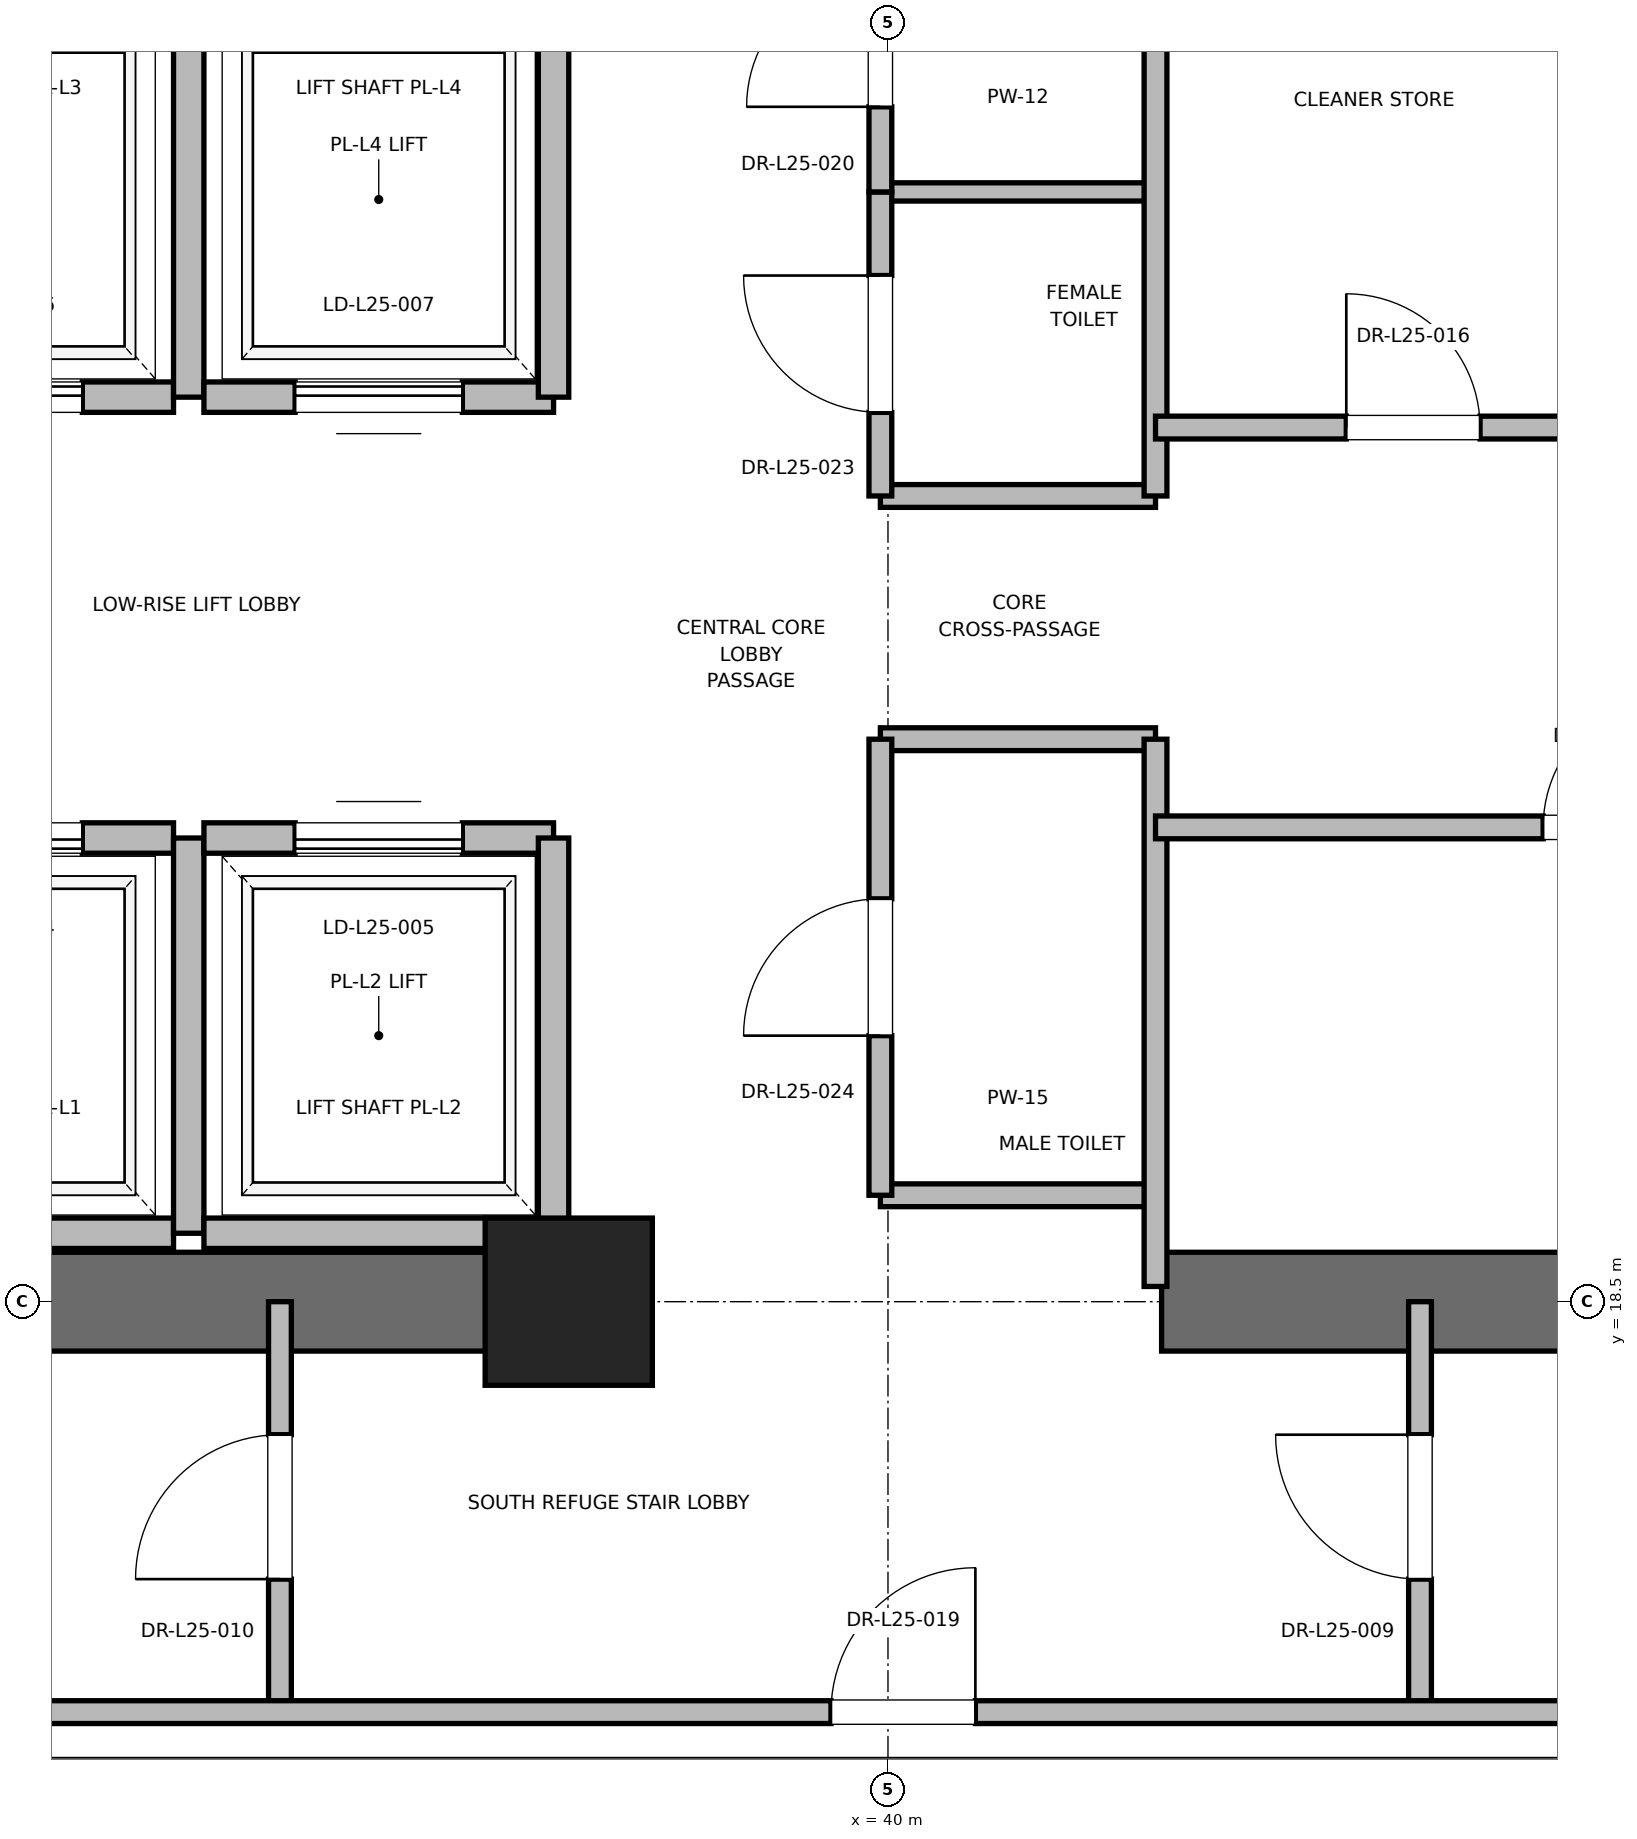
"""IFC4 building model, lengths in metres.
Left out: names, types, materials, properties, quantities, classifications, styles, units other than length and angle.
Written with IfcOpenShell. Run it as: python <this file> out.ifc"""

import sys

from ifc_helpers import new_model, si_unit, direction, frame, frame_2d, origin, origin_2d, place, context, subcontext, project, spatial, rectangle, extrude, element, fill, save


model = new_model("IFC4")
c1 = context("Model", 3, precision=1e-05, world=origin(), true_north=direction((0.0, 1.0)))
c2 = subcontext(c1, "Body", "Model", "MODEL_VIEW")
j1 = project(units=[si_unit("LENGTHUNIT", "METRE"), si_unit("PLANEANGLEUNIT", "RADIAN")], contexts=[c1])
p1 = place(None, origin())
s1 = spatial("IfcSite", under=j1, at=p1, CompositionType="ELEMENT")
p2 = place(p1, origin())
s2 = spatial("IfcBuilding", under=s1, at=p2, CompositionType="ELEMENT")
p3 = place(p2, frame((0.0, 0.0, 107.6)))
s3 = spatial("IfcBuildingStorey", under=s2, at=p3, CompositionType="ELEMENT", Elevation=107.6)
p4 = place(p3, frame((37.9, 18.5, 0.0), z_axis=(0.0, 0.0, 1.0), x_axis=(1.0, 0.0, 0.0)))
e1 = element("IfcColumn", 1, at=p4, inside=s3, PredefinedType="PILASTER", context=c2, shape_type="SweptSolid", body=[
    extrude(rectangle(XDim=1.1, YDim=1.1, at=origin_2d()), origin(), (0.0, 0.0, 1.0), 5.4),
])
for number, where, z_axis, x_axis in (
    (2, (29.0, 18.5, 0.0), (0.0, 0.0, 1.0), (1.0, 0.0, 0.0)),
    (3, (41.8, 18.5, 0.0), (0.0, 0.0, 1.0), (1.0, 0.0, 0.0)),
):
    element("IfcWall", number, at=place(p3, frame(where, z_axis=z_axis, x_axis=x_axis)), inside=s3, PredefinedType="SHEAR", context=c2, shape_type="SweptSolid", body=[
        extrude(rectangle(XDim=9.2, YDim=0.65, at=frame_2d((4.6, 0.0))), origin(), (0.0, 0.0, 1.0), 5.1),
    ])
p5 = place(p3, frame((33.0, 18.95, 0.0), z_axis=(0.0, 0.0, 1.0), x_axis=(1.0, 0.0, 0.0)))
e4 = element("IfcWall", 4, at=p5, inside=s3, PredefinedType="SOLIDWALL", context=c2, shape_type="SweptSolid", body=[
    extrude(rectangle(XDim=2.3, YDim=0.2, at=frame_2d((1.15, 0.0))), origin(), (0.0, 0.0, 1.0), 5.1),
])
p6 = place(p3, frame((35.3, 21.55, 0.0), z_axis=(0.0, 0.0, 1.0), x_axis=(-1.0, 0.0, 0.0)))
e5 = element("IfcWall", 5, at=p6, inside=s3, PredefinedType="SOLIDWALL", context=c2, shape_type="SweptSolid", body=[
    extrude(rectangle(XDim=2.3, YDim=0.2, at=frame_2d((1.15, 0.0))), origin(), (0.0, 0.0, 1.0), 5.1),
])
p7 = place(p6, frame((0.6, 0.0, 0.0)))
e6 = element("IfcOpeningElement", 6, at=p7, cuts=e5, PredefinedType="OPENING", context=c2, shape_type="SweptSolid", body=[
    extrude(rectangle(XDim=1.1, YDim=2.2, at=frame_2d((0.55, 1.1))), frame((0.0, 0.1, 0.0), z_axis=(0.0, -1.0, 0.0), x_axis=(1.0, 0.0, 0.0)), (0.0, 0.0, 1.0), 0.2),
])
p8 = place(p3, frame((35.4, 18.95, 0.0), z_axis=(0.0, 0.0, 1.0), x_axis=(0.0, 1.0, 0.0)))
e7 = element("IfcWall", 7, at=p8, inside=s3, PredefinedType="SOLIDWALL", context=c2, shape_type="SweptSolid", body=[
    extrude(rectangle(XDim=2.6, YDim=0.2, at=frame_2d((1.3, 0.0))), origin(), (0.0, 0.0, 1.0), 5.1),
])
p9 = place(p3, frame((35.5, 18.95, 0.0), z_axis=(0.0, 0.0, 1.0), x_axis=(1.0, 0.0, 0.0)))
e8 = element("IfcWall", 8, at=p9, inside=s3, PredefinedType="SOLIDWALL", context=c2, shape_type="SweptSolid", body=[
    extrude(rectangle(XDim=2.3, YDim=0.2, at=frame_2d((1.15, 0.0))), origin(), (0.0, 0.0, 1.0), 3.88),
])
p10 = place(p3, frame((37.8, 21.55, 0.0), z_axis=(0.0, 0.0, 1.0), x_axis=(-1.0, 0.0, 0.0)))
e9 = element("IfcWall", 9, at=p10, inside=s3, PredefinedType="SOLIDWALL", context=c2, shape_type="SweptSolid", body=[
    extrude(rectangle(XDim=2.3, YDim=0.2, at=frame_2d((1.15, 0.0))), origin(), (0.0, 0.0, 1.0), 5.1),
])
p11 = place(p10, frame((0.6, 0.0, 0.0)))
e10 = element("IfcOpeningElement", 10, at=p11, cuts=e9, PredefinedType="OPENING", context=c2, shape_type="SweptSolid", body=[
    extrude(rectangle(XDim=1.1, YDim=2.2, at=frame_2d((0.55, 1.1))), frame((0.0, 0.1, 0.0), z_axis=(0.0, -1.0, 0.0), x_axis=(1.0, 0.0, 0.0)), (0.0, 0.0, 1.0), 0.2),
])
p12 = place(p3, frame((37.8, 18.95, 0.0), z_axis=(0.0, 0.0, 1.0), x_axis=(0.0, 1.0, 0.0)))
e11 = element("IfcWall", 11, at=p12, inside=s3, PredefinedType="SOLIDWALL", context=c2, shape_type="SweptSolid", body=[
    extrude(rectangle(XDim=2.6, YDim=0.2, at=frame_2d((1.3, 0.0))), origin(), (0.0, 0.0, 1.0), 3.88),
])
p13 = place(p3, frame((33.0, 24.45, 0.0), z_axis=(0.0, 0.0, 1.0), x_axis=(1.0, 0.0, 0.0)))
e12 = element("IfcWall", 12, at=p13, inside=s3, PredefinedType="SOLIDWALL", context=c2, shape_type="SweptSolid", body=[
    extrude(rectangle(XDim=2.3, YDim=0.2, at=frame_2d((1.15, 0.0))), origin(), (0.0, 0.0, 1.0), 5.1),
])
p14 = place(p13, frame((0.6, 0.0, 0.0)))
e13 = element("IfcOpeningElement", 13, at=p14, cuts=e12, PredefinedType="OPENING", context=c2, shape_type="SweptSolid", body=[
    extrude(rectangle(XDim=1.1, YDim=2.2, at=frame_2d((0.55, 1.1))), frame((0.0, 0.1, 0.0), z_axis=(0.0, -1.0, 0.0), x_axis=(1.0, 0.0, 0.0)), (0.0, 0.0, 1.0), 0.2),
])
p15 = place(p3, frame((35.4, 24.45, 0.0), z_axis=(0.0, 0.0, 1.0), x_axis=(0.0, 1.0, 0.0)))
e14 = element("IfcWall", 14, at=p15, inside=s3, PredefinedType="SOLIDWALL", context=c2, shape_type="SweptSolid", body=[
    extrude(rectangle(XDim=2.6, YDim=0.2, at=frame_2d((1.3, 0.0))), origin(), (0.0, 0.0, 1.0), 5.1),
])
p16 = place(p3, frame((35.5, 24.45, 0.0), z_axis=(0.0, 0.0, 1.0), x_axis=(1.0, 0.0, 0.0)))
e15 = element("IfcWall", 15, at=p16, inside=s3, PredefinedType="SOLIDWALL", context=c2, shape_type="SweptSolid", body=[
    extrude(rectangle(XDim=2.3, YDim=0.2, at=frame_2d((1.15, 0.0))), origin(), (0.0, 0.0, 1.0), 5.1),
])
p17 = place(p16, frame((0.6, 0.0, 0.0)))
e16 = element("IfcOpeningElement", 16, at=p17, cuts=e15, PredefinedType="OPENING", context=c2, shape_type="SweptSolid", body=[
    extrude(rectangle(XDim=1.1, YDim=2.2, at=frame_2d((0.55, 1.1))), frame((0.0, 0.1, 0.0), z_axis=(0.0, -1.0, 0.0), x_axis=(1.0, 0.0, 0.0)), (0.0, 0.0, 1.0), 0.2),
])
p18 = place(p3, frame((37.8, 24.45, 0.0), z_axis=(0.0, 0.0, 1.0), x_axis=(0.0, 1.0, 0.0)))
e17 = element("IfcWall", 17, at=p18, inside=s3, PredefinedType="SOLIDWALL", context=c2, shape_type="SweptSolid", body=[
    extrude(rectangle(XDim=2.6, YDim=0.2, at=frame_2d((1.3, 0.0))), origin(), (0.0, 0.0, 1.0), 5.1),
])
for number, where, z_axis, x_axis in (
    (18, (39.95, 19.2, 0.0), (0.0, 0.0, 1.0), (1.0, 0.0, 0.0)),
    (19, (39.95, 22.2, 0.0), (0.0, 0.0, 1.0), (1.0, 0.0, 0.0)),
    (20, (39.95, 23.8, 0.0), (0.0, 0.0, 1.0), (1.0, 0.0, 0.0)),
):
    element("IfcWall", number, at=place(p3, frame(where, z_axis=z_axis, x_axis=x_axis)), inside=s3, PredefinedType="PARTITIONING", context=c2, shape_type="SweptSolid", body=[
        extrude(rectangle(XDim=1.81, YDim=0.15, at=frame_2d((0.905, 0.0))), origin(), (0.0, 0.0, 1.0), 2.85),
    ])
p19 = place(p3, frame((39.95, 25.8, 0.0), z_axis=(0.0, 0.0, 1.0), x_axis=(1.0, 0.0, 0.0)))
e21 = element("IfcWall", 21, at=p19, inside=s3, PredefinedType="PARTITIONING", context=c2, shape_type="SweptSolid", body=[
    extrude(rectangle(XDim=1.81, YDim=0.12, at=frame_2d((0.905, 0.0))), origin(), (0.0, 0.0, 1.0), 2.85),
])
p20 = place(p3, frame((41.76, 18.6, 0.0), z_axis=(0.0, 0.0, 1.0), x_axis=(0.0, 1.0, 0.0)))
e22 = element("IfcWall", 22, at=p20, inside=s3, PredefinedType="PARTITIONING", context=c2, shape_type="SweptSolid", body=[
    extrude(rectangle(XDim=3.6, YDim=0.15, at=frame_2d((1.8, 0.0))), origin(), (0.0, 0.0, 1.0), 2.85),
])
p21 = place(p3, frame((41.76, 23.8, 0.0), z_axis=(0.0, 0.0, 1.0), x_axis=(0.0, 1.0, 0.0)))
e23 = element("IfcWall", 23, at=p21, inside=s3, PredefinedType="PARTITIONING", context=c2, shape_type="SweptSolid", body=[
    extrude(rectangle(XDim=4.0, YDim=0.15, at=frame_2d((2.0, 0.0))), origin(), (0.0, 0.0, 1.0), 2.85),
])
p22 = place(p3, frame((39.95, 19.2, 0.0), z_axis=(0.0, 0.0, 1.0), x_axis=(0.0, 1.0, 0.0)))
e24 = element("IfcWall", 24, at=p22, inside=s3, PredefinedType="PARTITIONING", context=c2, shape_type="SweptSolid", body=[
    extrude(rectangle(XDim=3.0, YDim=0.15, at=frame_2d((1.5, 0.0))), origin(), (0.0, 0.0, 1.0), 2.85),
])
p23 = place(p22, frame((1.05, 0.0, 0.0)))
e25 = element("IfcOpeningElement", 25, at=p23, cuts=e24, PredefinedType="OPENING", context=c2, shape_type="SweptSolid", body=[
    extrude(rectangle(XDim=0.9, YDim=2.1, at=frame_2d((0.45, 1.05))), frame((0.0, 0.075, 0.0), z_axis=(0.0, -1.0, 0.0), x_axis=(1.0, 0.0, 0.0)), (0.0, 0.0, 1.0), 0.15),
])
p24 = place(p3, frame((39.95, 23.8, 0.0), z_axis=(0.0, 0.0, 1.0), x_axis=(0.0, 1.0, 0.0)))
e26 = element("IfcWall", 26, at=p24, inside=s3, PredefinedType="PARTITIONING", context=c2, shape_type="SweptSolid", body=[
    extrude(rectangle(XDim=2.0, YDim=0.15, at=frame_2d((1.0, 0.0))), origin(), (0.0, 0.0, 1.0), 2.85),
])
p25 = place(p24, frame((0.55, 0.0, 0.0)))
e27 = element("IfcOpeningElement", 27, at=p25, cuts=e26, PredefinedType="OPENING", context=c2, shape_type="SweptSolid", body=[
    extrude(rectangle(XDim=0.9, YDim=2.1, at=frame_2d((0.45, 1.05))), frame((0.0, 0.075, 0.0), z_axis=(0.0, -1.0, 0.0), x_axis=(1.0, 0.0, 0.0)), (0.0, 0.0, 1.0), 0.15),
])
p26 = place(p3, frame((39.95, 25.8, 0.0), z_axis=(0.0, 0.0, 1.0), x_axis=(0.0, 1.0, 0.0)))
e28 = element("IfcWall", 28, at=p26, inside=s3, PredefinedType="PARTITIONING", context=c2, shape_type="SweptSolid", body=[
    extrude(rectangle(XDim=2.0, YDim=0.15, at=frame_2d((1.0, 0.0))), origin(), (0.0, 0.0, 1.0), 2.85),
])
p27 = place(p26, frame((0.56, 0.0, 0.0)))
e29 = element("IfcOpeningElement", 29, at=p27, cuts=e28, PredefinedType="OPENING", context=c2, shape_type="SweptSolid", body=[
    extrude(rectangle(XDim=0.88, YDim=2.1, at=frame_2d((0.44, 1.05))), frame((0.0, 0.075, 0.0), z_axis=(0.0, -1.0, 0.0), x_axis=(1.0, 0.0, 0.0)), (0.0, 0.0, 1.0), 0.15),
])
p28 = place(p3, frame((41.76, 21.62, 0.0), z_axis=(0.0, 0.0, 1.0), x_axis=(1.0, 0.0, 0.0)))
e30 = element("IfcWall", 30, at=p28, inside=s3, PredefinedType="PARTITIONING", context=c2, shape_type="SweptSolid", body=[
    extrude(rectangle(XDim=5.98, YDim=0.15, at=frame_2d((2.99, 0.0))), origin(), (0.0, 0.0, 1.0), 2.85),
])
p29 = place(p28, frame((2.55, 0.0, 0.0)))
e31 = element("IfcOpeningElement", 31, at=p29, cuts=e30, PredefinedType="OPENING", context=c2, shape_type="SweptSolid", body=[
    extrude(rectangle(XDim=0.88, YDim=2.1, at=frame_2d((0.44, 1.05))), frame((0.0, 0.075, 0.0), z_axis=(0.0, -1.0, 0.0), x_axis=(1.0, 0.0, 0.0)), (0.0, 0.0, 1.0), 0.15),
])
p30 = place(p3, frame((41.76, 24.25, 0.0), z_axis=(0.0, 0.0, 1.0), x_axis=(1.0, 0.0, 0.0)))
e32 = element("IfcWall", 32, at=p30, inside=s3, PredefinedType="PARTITIONING", context=c2, shape_type="SweptSolid", body=[
    extrude(rectangle(XDim=3.39, YDim=0.15, at=frame_2d((1.695, 0.0))), origin(), (0.0, 0.0, 1.0), 2.85),
])
p31 = place(p30, frame((1.255, 0.0, 0.0)))
e33 = element("IfcOpeningElement", 33, at=p31, cuts=e32, PredefinedType="OPENING", context=c2, shape_type="SweptSolid", body=[
    extrude(rectangle(XDim=0.88, YDim=2.1, at=frame_2d((0.44, 1.05))), frame((0.0, 0.075, 0.0), z_axis=(0.0, -1.0, 0.0), x_axis=(1.0, 0.0, 0.0)), (0.0, 0.0, 1.0), 0.15),
])
p32 = place(p3, frame((36.0, 15.8, 0.0), z_axis=(0.0, 0.0, 1.0), x_axis=(0.0, 1.0, 0.0)))
e34 = element("IfcWall", 34, at=p32, inside=s3, PredefinedType="PARTITIONING", context=c2, shape_type="SweptSolid", body=[
    extrude(rectangle(XDim=2.7, YDim=0.15, at=frame_2d((1.35, 0.0))), origin(), (0.0, 0.0, 1.0), 2.85),
])
p33 = place(p32, frame((0.875, 0.0, 0.0)))
e35 = element("IfcOpeningElement", 35, at=p33, cuts=e34, PredefinedType="OPENING", context=c2, shape_type="SweptSolid", body=[
    extrude(rectangle(XDim=0.95, YDim=2.15, at=frame_2d((0.475, 1.075))), frame((0.0, 0.075, 0.0), z_axis=(0.0, -1.0, 0.0), x_axis=(1.0, 0.0, 0.0)), (0.0, 0.0, 1.0), 0.15),
])
p34 = place(p3, frame((43.5, 15.8, 0.0), z_axis=(0.0, 0.0, 1.0), x_axis=(0.0, 1.0, 0.0)))
e36 = element("IfcWall", 36, at=p34, inside=s3, PredefinedType="PARTITIONING", context=c2, shape_type="SweptSolid", body=[
    extrude(rectangle(XDim=2.7, YDim=0.15, at=frame_2d((1.35, 0.0))), origin(), (0.0, 0.0, 1.0), 2.85),
])
p35 = place(p34, frame((0.875, 0.0, 0.0)))
e37 = element("IfcOpeningElement", 37, at=p35, cuts=e36, PredefinedType="OPENING", context=c2, shape_type="SweptSolid", body=[
    extrude(rectangle(XDim=0.95, YDim=2.15, at=frame_2d((0.475, 1.075))), frame((0.0, 0.075, 0.0), z_axis=(0.0, -1.0, 0.0), x_axis=(1.0, 0.0, 0.0)), (0.0, 0.0, 1.0), 0.15),
])
p36 = place(p3, frame((29.25, 15.8, 0.0), z_axis=(0.0, 0.0, 1.0), x_axis=(1.0, 0.0, 0.0)))
e38 = element("IfcWall", 38, at=p36, inside=s3, PredefinedType="PARTITIONING", context=c2, shape_type="SweptSolid", body=[
    extrude(rectangle(XDim=21.5, YDim=0.15, at=frame_2d((10.75, 0.0))), origin(), (0.0, 0.0, 1.0), 2.85),
])
p37 = place(p36, frame((10.375, 0.0, 0.0)))
e39 = element("IfcOpeningElement", 39, at=p37, cuts=e38, PredefinedType="OPENING", context=c2, shape_type="SweptSolid", body=[
    extrude(rectangle(XDim=0.95, YDim=2.15, at=frame_2d((0.475, 1.075))), frame((0.0, 0.075, 0.0), z_axis=(0.0, -1.0, 0.0), x_axis=(1.0, 0.0, 0.0)), (0.0, 0.0, 1.0), 0.15),
])
p38 = place(p7, origin())
e40 = element("IfcDoor", 40, at=p38, inside=s3, OperationType="SLIDING_TO_RIGHT", PredefinedType="DOOR", context=c2, shape_type="SweptSolid", body=[
    extrude(rectangle(XDim=1.1, YDim=2.2, at=frame_2d((0.55, 1.1))), frame((0.0, 0.025, 0.0), z_axis=(0.0, -1.0, 0.0), x_axis=(1.0, 0.0, 0.0)), (0.0, 0.0, 1.0), 0.05),
])
fill(e6, e40)
p39 = place(p11, origin())
e41 = element("IfcDoor", 41, at=p39, inside=s3, OperationType="SLIDING_TO_RIGHT", PredefinedType="DOOR", context=c2, shape_type="SweptSolid", body=[
    extrude(rectangle(XDim=1.1, YDim=2.2, at=frame_2d((0.55, 1.1))), frame((0.0, 0.025, 0.0), z_axis=(0.0, -1.0, 0.0), x_axis=(1.0, 0.0, 0.0)), (0.0, 0.0, 1.0), 0.05),
])
fill(e10, e41)
p40 = place(p14, origin())
e42 = element("IfcDoor", 42, at=p40, inside=s3, OperationType="SLIDING_TO_RIGHT", PredefinedType="DOOR", context=c2, shape_type="SweptSolid", body=[
    extrude(rectangle(XDim=1.1, YDim=2.2, at=frame_2d((0.55, 1.1))), frame((0.0, 0.025, 0.0), z_axis=(0.0, -1.0, 0.0), x_axis=(1.0, 0.0, 0.0)), (0.0, 0.0, 1.0), 0.05),
])
fill(e13, e42)
p41 = place(p17, origin())
e43 = element("IfcDoor", 43, at=p41, inside=s3, OperationType="SLIDING_TO_RIGHT", PredefinedType="DOOR", context=c2, shape_type="SweptSolid", body=[
    extrude(rectangle(XDim=1.1, YDim=2.2, at=frame_2d((0.55, 1.1))), frame((0.0, 0.025, 0.0), z_axis=(0.0, -1.0, 0.0), x_axis=(1.0, 0.0, 0.0)), (0.0, 0.0, 1.0), 0.05),
])
fill(e16, e43)
p42 = place(p23, origin())
e44 = element("IfcDoor", 44, at=p42, inside=s3, OperationType="SINGLE_SWING_LEFT", PredefinedType="DOOR", context=c2, shape_type="SweptSolid", body=[
    extrude(rectangle(XDim=0.9, YDim=2.1, at=frame_2d((0.45, 1.05))), frame((0.0, 0.025, 0.0), z_axis=(0.0, -1.0, 0.0), x_axis=(1.0, 0.0, 0.0)), (0.0, 0.0, 1.0), 0.05),
])
fill(e25, e44)
p43 = place(p25, origin())
e45 = element("IfcDoor", 45, at=p43, inside=s3, OperationType="SINGLE_SWING_RIGHT", PredefinedType="DOOR", context=c2, shape_type="SweptSolid", body=[
    extrude(rectangle(XDim=0.9, YDim=2.1, at=frame_2d((0.45, 1.05))), frame((0.0, 0.025, 0.0), z_axis=(0.0, -1.0, 0.0), x_axis=(1.0, 0.0, 0.0)), (0.0, 0.0, 1.0), 0.05),
])
fill(e27, e45)
p44 = place(p27, origin())
e46 = element("IfcDoor", 46, at=p44, inside=s3, OperationType="SINGLE_SWING_LEFT", PredefinedType="DOOR", context=c2, shape_type="SweptSolid", body=[
    extrude(rectangle(XDim=0.88, YDim=2.1, at=frame_2d((0.44, 1.05))), frame((0.0, 0.025, 0.0), z_axis=(0.0, -1.0, 0.0), x_axis=(1.0, 0.0, 0.0)), (0.0, 0.0, 1.0), 0.05),
])
fill(e29, e46)
p45 = place(p29, origin())
e47 = element("IfcDoor", 47, at=p45, inside=s3, OperationType="SINGLE_SWING_RIGHT", PredefinedType="DOOR", context=c2, shape_type="SweptSolid", body=[
    extrude(rectangle(XDim=0.88, YDim=2.1, at=frame_2d((0.44, 1.05))), frame((0.0, 0.025, 0.0), z_axis=(0.0, -1.0, 0.0), x_axis=(1.0, 0.0, 0.0)), (0.0, 0.0, 1.0), 0.05),
])
fill(e31, e47)
p46 = place(p31, origin())
e48 = element("IfcDoor", 48, at=p46, inside=s3, OperationType="SINGLE_SWING_LEFT", PredefinedType="DOOR", context=c2, shape_type="SweptSolid", body=[
    extrude(rectangle(XDim=0.88, YDim=2.1, at=frame_2d((0.44, 1.05))), frame((0.0, 0.025, 0.0), z_axis=(0.0, -1.0, 0.0), x_axis=(1.0, 0.0, 0.0)), (0.0, 0.0, 1.0), 0.05),
])
fill(e33, e48)
p47 = place(p33, origin())
e49 = element("IfcDoor", 49, at=p47, inside=s3, OperationType="SINGLE_SWING_LEFT", PredefinedType="DOOR", context=c2, shape_type="SweptSolid", body=[
    extrude(rectangle(XDim=0.95, YDim=2.15, at=frame_2d((0.475, 1.075))), frame((0.0, 0.025, 0.0), z_axis=(0.0, -1.0, 0.0), x_axis=(1.0, 0.0, 0.0)), (0.0, 0.0, 1.0), 0.05),
])
fill(e35, e49)
p48 = place(p35, origin())
e50 = element("IfcDoor", 50, at=p48, inside=s3, OperationType="SINGLE_SWING_RIGHT", PredefinedType="DOOR", context=c2, shape_type="SweptSolid", body=[
    extrude(rectangle(XDim=0.95, YDim=2.15, at=frame_2d((0.475, 1.075))), frame((0.0, 0.025, 0.0), z_axis=(0.0, -1.0, 0.0), x_axis=(1.0, 0.0, 0.0)), (0.0, 0.0, 1.0), 0.05),
])
fill(e37, e50)
p49 = place(p37, origin())
e51 = element("IfcDoor", 51, at=p49, inside=s3, OperationType="SINGLE_SWING_RIGHT", PredefinedType="DOOR", context=c2, shape_type="SweptSolid", body=[
    extrude(rectangle(XDim=0.95, YDim=2.15, at=frame_2d((0.475, 1.075))), frame((0.0, 0.025, 0.0), z_axis=(0.0, -1.0, 0.0), x_axis=(1.0, 0.0, 0.0)), (0.0, 0.0, 1.0), 0.05),
])
fill(e39, e51)
save(model, sys.argv[1])
